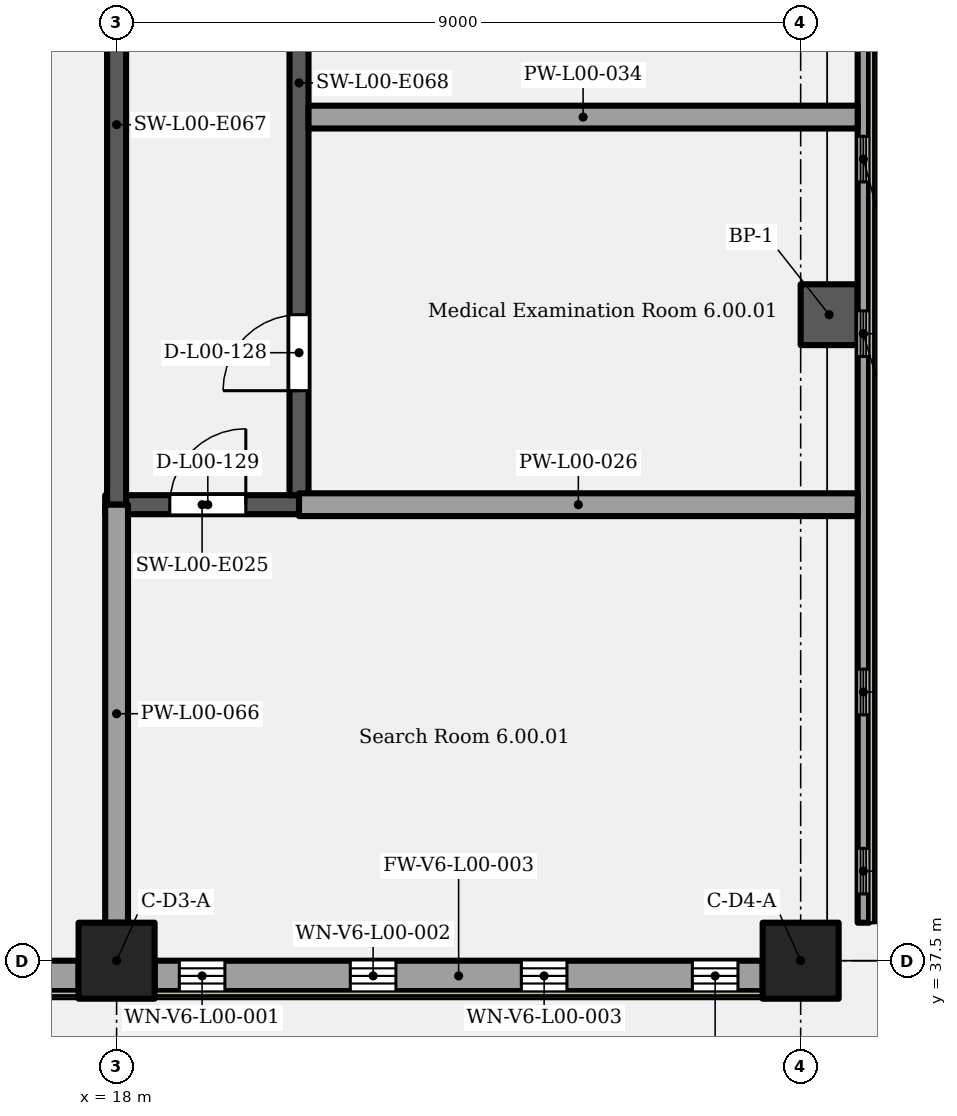
"""IFC4 building model, lengths in metres.
Left out: names, types, materials, properties, quantities, classifications, styles, units other than length and angle.
Written with IfcOpenShell. Run it as: python <this file> out.ifc"""

import sys

from ifc_helpers import new_model, si_unit, direction, frame, frame_2d, origin, origin_2d, place, context, subcontext, project, spatial, rectangle, extrude, element, fill, save


model = new_model("IFC4")
c1 = context("Model", 3, precision=1e-05, world=origin(), true_north=direction((0.0, 1.0)))
c2 = subcontext(c1, "Body", "Model", "MODEL_VIEW")
j1 = project(units=[si_unit("LENGTHUNIT", "METRE"), si_unit("PLANEANGLEUNIT", "RADIAN")], contexts=[c1])
p1 = place(None, origin())
s1 = spatial("IfcSite", under=j1, at=p1, CompositionType="ELEMENT")
p2 = place(p1, origin())
s2 = spatial("IfcBuilding", under=s1, at=p2, CompositionType="ELEMENT")
p3 = place(p2, origin())
s3 = spatial("IfcBuildingStorey", under=s2, at=p3, CompositionType="ELEMENT", Elevation=0.0)
for number, where, z_axis, x_axis in (
    (1, (18.0, 37.5, 0.0), (0.0, 0.0, 1.0), (1.0, 0.0, 0.0)),
    (2, (27.0, 37.5, 0.0), (0.0, 0.0, 1.0), (1.0, 0.0, 0.0)),
):
    element("IfcColumn", number, at=place(p3, frame(where, z_axis=z_axis, x_axis=x_axis)), inside=s3, PredefinedType="COLUMN", context=c2, shape_type="SweptSolid", body=[
        extrude(rectangle(XDim=1.0, YDim=1.0, at=origin_2d()), origin(), (0.0, 0.0, 1.0), 6.6),
    ])
p4 = place(p3, frame((27.375, 45.6, 0.0), z_axis=(0.0, 0.0, 1.0), x_axis=(0.0, 1.0, 0.0)))
e3 = element("IfcWall", 3, at=p4, inside=s3, PredefinedType="SOLIDWALL", context=c2, shape_type="SweptSolid", body=[
    extrude(rectangle(XDim=0.8, YDim=0.75, at=frame_2d((0.4, 0.0))), origin(), (0.0, 0.0, 1.0), 5.8),
])
p5 = place(p3, frame((9.5, 37.3, 0.0), z_axis=(0.0, 0.0, 1.0), x_axis=(1.0, 0.0, 0.0)))
e4 = element("IfcWall", 4, at=p5, inside=s3, PredefinedType="SOLIDWALL", context=c2, shape_type="SweptSolid", body=[
    extrude(rectangle(XDim=8.0, YDim=0.4, at=frame_2d((4.0, 0.0))), origin(), (0.0, 0.0, 1.0), 6.3),
])
p6 = place(p3, frame((18.5, 37.3, 0.0), z_axis=(0.0, 0.0, 1.0), x_axis=(1.0, 0.0, 0.0)))
e5 = element("IfcWall", 5, at=p6, inside=s3, PredefinedType="SOLIDWALL", context=c2, shape_type="SweptSolid", body=[
    extrude(rectangle(XDim=8.0, YDim=0.4, at=frame_2d((4.0, 0.0))), origin(), (0.0, 0.0, 1.0), 6.3),
])
p7 = place(p6, frame((0.325, 0.0, 1.5)))
e6 = element("IfcOpeningElement", 6, at=p7, cuts=e5, PredefinedType="OPENING", context=c2, shape_type="SweptSolid", body=[
    extrude(rectangle(XDim=0.6, YDim=3.0, at=frame_2d((0.3, 1.5))), frame((0.0, 0.21, 0.0), z_axis=(0.0, -1.0, 0.0), x_axis=(1.0, 0.0, 0.0)), (0.0, 0.0, 1.0), 0.42),
])
p8 = place(p6, frame((2.575, 0.0, 1.5)))
e7 = element("IfcOpeningElement", 7, at=p8, cuts=e5, PredefinedType="OPENING", context=c2, shape_type="SweptSolid", body=[
    extrude(rectangle(XDim=0.6, YDim=3.0, at=frame_2d((0.3, 1.5))), frame((0.0, 0.21, 0.0), z_axis=(0.0, -1.0, 0.0), x_axis=(1.0, 0.0, 0.0)), (0.0, 0.0, 1.0), 0.42),
])
p9 = place(p6, frame((4.825, 0.0, 1.5)))
e8 = element("IfcOpeningElement", 8, at=p9, cuts=e5, PredefinedType="OPENING", context=c2, shape_type="SweptSolid", body=[
    extrude(rectangle(XDim=0.6, YDim=3.0, at=frame_2d((0.3, 1.5))), frame((0.0, 0.21, 0.0), z_axis=(0.0, -1.0, 0.0), x_axis=(1.0, 0.0, 0.0)), (0.0, 0.0, 1.0), 0.42),
])
p10 = place(p6, frame((7.075, 0.0, 1.5)))
e9 = element("IfcOpeningElement", 9, at=p10, cuts=e5, PredefinedType="OPENING", context=c2, shape_type="SweptSolid", body=[
    extrude(rectangle(XDim=0.6, YDim=3.0, at=frame_2d((0.3, 1.5))), frame((0.0, 0.21, 0.0), z_axis=(0.0, -1.0, 0.0), x_axis=(1.0, 0.0, 0.0)), (0.0, 0.0, 1.0), 0.42),
])
p11 = place(p3, frame((27.825, 38.0, 0.0), z_axis=(0.0, 0.0, 1.0), x_axis=(0.0, 1.0, 0.0)))
e10 = element("IfcWall", 10, at=p11, inside=s3, PredefinedType="SOLIDWALL", context=c2, shape_type="SweptSolid", body=[
    extrude(rectangle(XDim=15.5, YDim=0.15, at=frame_2d((7.75, 0.0))), origin(), (0.0, 0.0, 1.0), 6.4),
])
p12 = place(p11, frame((0.379, 0.0, 1.5)))
e11 = element("IfcOpeningElement", 11, at=p12, cuts=e10, PredefinedType="OPENING", context=c2, shape_type="SweptSolid", body=[
    extrude(rectangle(XDim=0.6, YDim=3.0, at=frame_2d((0.3, 1.5))), frame((0.0, 0.085, 0.0), z_axis=(0.0, -1.0, 0.0), x_axis=(1.0, 0.0, 0.0)), (0.0, 0.0, 1.0), 0.17),
])
p13 = place(p11, frame((2.736, 0.0, 1.5)))
e12 = element("IfcOpeningElement", 12, at=p13, cuts=e10, PredefinedType="OPENING", context=c2, shape_type="SweptSolid", body=[
    extrude(rectangle(XDim=0.6, YDim=3.0, at=frame_2d((0.3, 1.5))), frame((0.0, 0.085, 0.0), z_axis=(0.0, -1.0, 0.0), x_axis=(1.0, 0.0, 0.0)), (0.0, 0.0, 1.0), 0.17),
])
p14 = place(p11, frame((7.45, 0.0, 1.5)))
e13 = element("IfcOpeningElement", 13, at=p14, cuts=e10, PredefinedType="OPENING", context=c2, shape_type="SweptSolid", body=[
    extrude(rectangle(XDim=0.6, YDim=3.0, at=frame_2d((0.3, 1.5))), frame((0.0, 0.085, 0.0), z_axis=(0.0, -1.0, 0.0), x_axis=(1.0, 0.0, 0.0)), (0.0, 0.0, 1.0), 0.17),
])
p15 = place(p11, frame((9.747, 0.0, 1.5)))
e14 = element("IfcOpeningElement", 14, at=p15, cuts=e10, PredefinedType="OPENING", context=c2, shape_type="SweptSolid", body=[
    extrude(rectangle(XDim=0.6, YDim=3.0, at=frame_2d((0.3, 1.5))), frame((0.0, 0.085, 0.0), z_axis=(0.0, -1.0, 0.0), x_axis=(1.0, 0.0, 0.0)), (0.0, 0.0, 1.0), 0.17),
])
p16 = place(p11, frame((12.164, 0.0, 1.5)))
e15 = element("IfcOpeningElement", 15, at=p16, cuts=e10, PredefinedType="OPENING", context=c2, shape_type="SweptSolid", body=[
    extrude(rectangle(XDim=0.6, YDim=3.0, at=frame_2d((0.3, 1.5))), frame((0.0, 0.085, 0.0), z_axis=(0.0, -1.0, 0.0), x_axis=(1.0, 0.0, 0.0)), (0.0, 0.0, 1.0), 0.17),
])
p17 = place(p11, frame((14.521, 0.0, 1.5)))
e16 = element("IfcOpeningElement", 16, at=p17, cuts=e10, PredefinedType="OPENING", context=c2, shape_type="SweptSolid", body=[
    extrude(rectangle(XDim=0.6, YDim=3.0, at=frame_2d((0.3, 1.5))), frame((0.0, 0.085, 0.0), z_axis=(0.0, -1.0, 0.0), x_axis=(1.0, 0.0, 0.0)), (0.0, 0.0, 1.0), 0.17),
])
p18 = place(p3, frame((17.85, 43.5, 0.0), z_axis=(0.0, 0.0, 1.0), x_axis=(1.0, 0.0, 0.0)))
e17 = element("IfcWall", 17, at=p18, inside=s3, PredefinedType="SHEAR", context=c2, shape_type="SweptSolid", body=[
    extrude(rectangle(XDim=2.55, YDim=0.25, at=frame_2d((1.275, 0.0))), origin(), (0.0, 0.0, 1.0), 6.3),
])
p19 = place(p18, frame((0.85, 0.0, 0.0)))
e18 = element("IfcOpeningElement", 18, at=p19, cuts=e17, PredefinedType="OPENING", context=c2, shape_type="SweptSolid", body=[
    extrude(rectangle(XDim=1.0, YDim=2.1, at=frame_2d((0.5, 1.05))), frame((0.0, 0.135, 0.0), z_axis=(0.0, -1.0, 0.0), x_axis=(1.0, 0.0, 0.0)), (0.0, 0.0, 1.0), 0.27),
])
p20 = place(p3, frame((20.4, 43.5, 0.0), z_axis=(0.0, 0.0, 1.0), x_axis=(1.0, 0.0, 0.0)))
e19 = element("IfcWall", 19, at=p20, inside=s3, PredefinedType="PARTITIONING", context=c2, shape_type="SweptSolid", body=[
    extrude(rectangle(XDim=7.35, YDim=0.3, at=frame_2d((3.675, 0.0))), origin(), (0.0, 0.0, 1.0), 6.3),
])
p21 = place(p3, frame((20.525, 48.6, 0.0), z_axis=(0.0, 0.0, 1.0), x_axis=(1.0, 0.0, 0.0)))
e20 = element("IfcWall", 20, at=p21, inside=s3, PredefinedType="PARTITIONING", context=c2, shape_type="SweptSolid", body=[
    extrude(rectangle(XDim=7.225, YDim=0.3, at=frame_2d((3.613, 0.0))), origin(), (0.0, 0.0, 1.0), 6.3),
])
p22 = place(p3, frame((18.0, 38.0, 0.0), z_axis=(0.0, 0.0, 1.0), x_axis=(0.0, 1.0, 0.0)))
e21 = element("IfcWall", 21, at=p22, inside=s3, PredefinedType="PARTITIONING", context=c2, shape_type="SweptSolid", body=[
    extrude(rectangle(XDim=5.5, YDim=0.3, at=frame_2d((2.75, 0.0))), origin(), (0.0, 0.0, 1.0), 5.35),
])
p23 = place(p3, frame((18.0, 43.5, 0.0), z_axis=(0.0, 0.0, 1.0), x_axis=(0.0, 1.0, 0.0)))
e22 = element("IfcWall", 22, at=p23, inside=s3, PredefinedType="SHEAR", context=c2, shape_type="SweptSolid", body=[
    extrude(rectangle(XDim=10.0, YDim=0.25, at=frame_2d((5.0, 0.0))), origin(), (0.0, 0.0, 1.0), 6.3),
])
p24 = place(p3, frame((20.4, 43.625, 0.0), z_axis=(0.0, 0.0, 1.0), x_axis=(0.0, 1.0, 0.0)))
e23 = element("IfcWall", 23, at=p24, inside=s3, PredefinedType="SHEAR", context=c2, shape_type="SweptSolid", body=[
    extrude(rectangle(XDim=10.85, YDim=0.25, at=frame_2d((5.425, 0.0))), origin(), (0.0, 0.0, 1.0), 6.3),
])
p25 = place(p24, frame((1.375, 0.0, 0.0)))
e24 = element("IfcOpeningElement", 24, at=p25, cuts=e23, PredefinedType="OPENING", context=c2, shape_type="SweptSolid", body=[
    extrude(rectangle(XDim=1.0, YDim=2.1, at=frame_2d((0.5, 1.05))), frame((0.0, 0.135, 0.0), z_axis=(0.0, -1.0, 0.0), x_axis=(1.0, 0.0, 0.0)), (0.0, 0.0, 1.0), 0.27),
])
p26 = place(p7, origin())
e25 = element("IfcWindow", 25, at=p26, inside=s3, PartitioningType="SINGLE_PANEL", PredefinedType="WINDOW", context=c2, shape_type="SweptSolid", body=[
    extrude(rectangle(XDim=0.6, YDim=3.0, at=frame_2d((0.3, 1.5))), frame((0.0, 0.03, 0.0), z_axis=(0.0, -1.0, 0.0), x_axis=(1.0, 0.0, 0.0)), (0.0, 0.0, 1.0), 0.06),
])
fill(e6, e25)
p27 = place(p8, origin())
e26 = element("IfcWindow", 26, at=p27, inside=s3, PartitioningType="SINGLE_PANEL", PredefinedType="WINDOW", context=c2, shape_type="SweptSolid", body=[
    extrude(rectangle(XDim=0.6, YDim=3.0, at=frame_2d((0.3, 1.5))), frame((0.0, 0.03, 0.0), z_axis=(0.0, -1.0, 0.0), x_axis=(1.0, 0.0, 0.0)), (0.0, 0.0, 1.0), 0.06),
])
fill(e7, e26)
p28 = place(p9, origin())
e27 = element("IfcWindow", 27, at=p28, inside=s3, PartitioningType="SINGLE_PANEL", PredefinedType="WINDOW", context=c2, shape_type="SweptSolid", body=[
    extrude(rectangle(XDim=0.6, YDim=3.0, at=frame_2d((0.3, 1.5))), frame((0.0, 0.03, 0.0), z_axis=(0.0, -1.0, 0.0), x_axis=(1.0, 0.0, 0.0)), (0.0, 0.0, 1.0), 0.06),
])
fill(e8, e27)
p29 = place(p10, origin())
e28 = element("IfcWindow", 28, at=p29, inside=s3, PartitioningType="SINGLE_PANEL", PredefinedType="WINDOW", context=c2, shape_type="SweptSolid", body=[
    extrude(rectangle(XDim=0.6, YDim=3.0, at=frame_2d((0.3, 1.5))), frame((0.0, 0.03, 0.0), z_axis=(0.0, -1.0, 0.0), x_axis=(1.0, 0.0, 0.0)), (0.0, 0.0, 1.0), 0.06),
])
fill(e9, e28)
p30 = place(p12, origin())
e29 = element("IfcWindow", 29, at=p30, inside=s3, PartitioningType="SINGLE_PANEL", PredefinedType="WINDOW", context=c2, shape_type="SweptSolid", body=[
    extrude(rectangle(XDim=0.6, YDim=3.0, at=frame_2d((0.3, 1.5))), frame((0.0, 0.03, 0.0), z_axis=(0.0, -1.0, 0.0), x_axis=(1.0, 0.0, 0.0)), (0.0, 0.0, 1.0), 0.06),
])
fill(e11, e29)
p31 = place(p13, origin())
e30 = element("IfcWindow", 30, at=p31, inside=s3, PartitioningType="SINGLE_PANEL", PredefinedType="WINDOW", context=c2, shape_type="SweptSolid", body=[
    extrude(rectangle(XDim=0.6, YDim=3.0, at=frame_2d((0.3, 1.5))), frame((0.0, 0.03, 0.0), z_axis=(0.0, -1.0, 0.0), x_axis=(1.0, 0.0, 0.0)), (0.0, 0.0, 1.0), 0.06),
])
fill(e12, e30)
p32 = place(p14, origin())
e31 = element("IfcWindow", 31, at=p32, inside=s3, PartitioningType="SINGLE_PANEL", PredefinedType="WINDOW", context=c2, shape_type="SweptSolid", body=[
    extrude(rectangle(XDim=0.6, YDim=3.0, at=frame_2d((0.3, 1.5))), frame((0.0, 0.03, 0.0), z_axis=(0.0, -1.0, 0.0), x_axis=(1.0, 0.0, 0.0)), (0.0, 0.0, 1.0), 0.06),
])
fill(e13, e31)
p33 = place(p15, origin())
e32 = element("IfcWindow", 32, at=p33, inside=s3, PartitioningType="SINGLE_PANEL", PredefinedType="WINDOW", context=c2, shape_type="SweptSolid", body=[
    extrude(rectangle(XDim=0.6, YDim=3.0, at=frame_2d((0.3, 1.5))), frame((0.0, 0.03, 0.0), z_axis=(0.0, -1.0, 0.0), x_axis=(1.0, 0.0, 0.0)), (0.0, 0.0, 1.0), 0.06),
])
fill(e14, e32)
p34 = place(p25, origin())
e33 = element("IfcDoor", 33, at=p34, inside=s3, OperationType="SINGLE_SWING_LEFT", PredefinedType="DOOR", context=c2, shape_type="SweptSolid", body=[
    extrude(rectangle(XDim=1.0, YDim=2.1, at=frame_2d((0.5, 1.05))), frame((0.0, 0.025, 0.0), z_axis=(0.0, -1.0, 0.0), x_axis=(1.0, 0.0, 0.0)), (0.0, 0.0, 1.0), 0.05),
])
fill(e24, e33)
p35 = place(p19, origin())
e34 = element("IfcDoor", 34, at=p35, inside=s3, OperationType="SINGLE_SWING_RIGHT", PredefinedType="DOOR", context=c2, shape_type="SweptSolid", body=[
    extrude(rectangle(XDim=1.0, YDim=2.1, at=frame_2d((0.5, 1.05))), frame((0.0, 0.025, 0.0), z_axis=(0.0, -1.0, 0.0), x_axis=(1.0, 0.0, 0.0)), (0.0, 0.0, 1.0), 0.05),
])
fill(e18, e34)
save(model, sys.argv[1])
